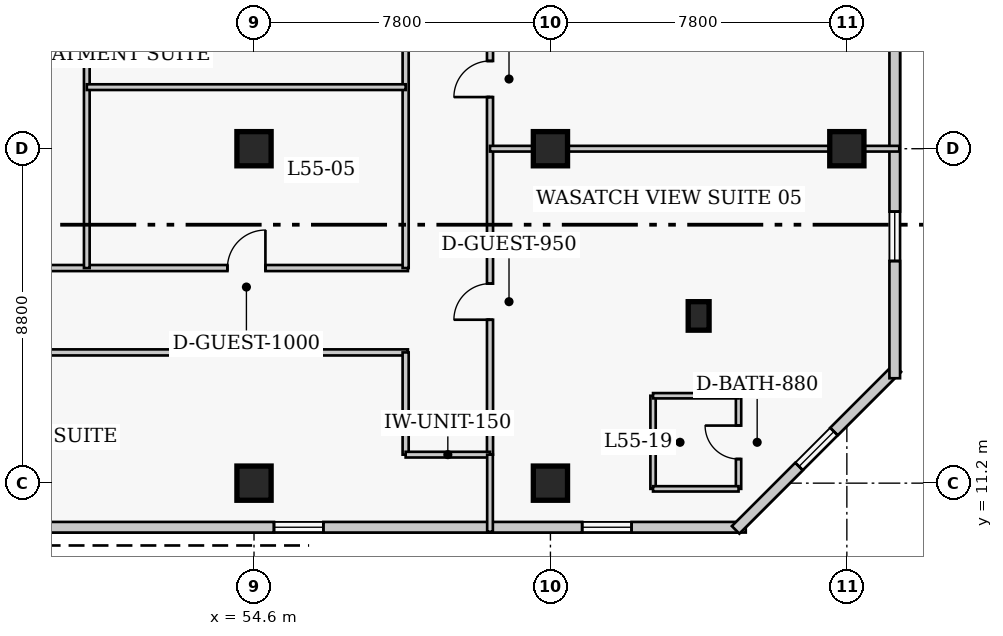
"""IFC4 building model, lengths in metres.
Left out: names, types, materials, properties, quantities, classifications, styles, units other than length and angle.
Written with IfcOpenShell. Run it as: python <this file> out.ifc"""

import sys

from ifc_helpers import new_model, si_unit, direction, frame, frame_2d, origin, origin_2d, place, context, subcontext, project, spatial, rectangle, extrude, element, fill, save


model = new_model("IFC4")
c1 = context("Model", 3, precision=1e-05, world=origin(), true_north=direction((0.0, 1.0)))
c2 = subcontext(c1, "Body", "Model", "MODEL_VIEW")
j1 = project(units=[si_unit("LENGTHUNIT", "METRE"), si_unit("PLANEANGLEUNIT", "RADIAN")], contexts=[c1])
p1 = place(None, origin())
s1 = spatial("IfcSite", under=j1, at=p1, CompositionType="ELEMENT")
p2 = place(p1, origin())
s2 = spatial("IfcBuilding", under=s1, at=p2, CompositionType="ELEMENT")
p3 = place(p2, frame((0.0, 0.0, 220.2)))
s3 = spatial("IfcBuildingStorey", under=s2, at=p3, CompositionType="ELEMENT", Elevation=220.2)
for number, where, z_axis, x_axis in (
    (1, (54.6, 11.2, 0.0), (0.0, 0.0, 1.0), (1.0, 0.0, 0.0)),
    (2, (54.6, 20.0, 0.0), (0.0, 0.0, 1.0), (1.0, 0.0, 0.0)),
    (3, (62.4, 11.2, 0.0), (0.0, 0.0, 1.0), (1.0, 0.0, 0.0)),
    (4, (62.4, 20.0, 0.0), (0.0, 0.0, 1.0), (1.0, 0.0, 0.0)),
    (5, (70.2, 20.0, 0.0), (0.0, 0.0, 1.0), (1.0, 0.0, 0.0)),
):
    element("IfcColumn", number, at=place(p3, frame(where, z_axis=z_axis, x_axis=x_axis)), inside=s3, PredefinedType="COLUMN", context=c2, shape_type="SweptSolid", body=[
        extrude(rectangle(XDim=0.9, YDim=0.9, at=origin_2d()), origin(), (0.0, 0.0, 1.0), 3.9),
    ])
p4 = place(p3, frame((66.3, 15.6, 0.0), z_axis=(0.0, 0.0, 1.0), x_axis=(1.0, 0.0, 0.0)))
e6 = element("IfcColumn", 6, at=p4, inside=s3, PredefinedType="PILASTER", context=c2, shape_type="SweptSolid", body=[
    extrude(rectangle(XDim=0.55, YDim=0.75, at=origin_2d()), origin(), (0.0, 0.0, 1.0), 3.9),
])
p5 = place(p3, frame((41.71, 10.04, 0.0), z_axis=(0.0, 0.0, 1.0), x_axis=(1.0, 0.0, 0.0)))
e7 = element("IfcWall", 7, at=p5, inside=s3, PredefinedType="SOLIDWALL", context=c2, shape_type="SweptSolid", body=[
    extrude(rectangle(XDim=25.83, YDim=0.28, at=frame_2d((12.915, 0.0))), origin(), (0.0, 0.0, 1.0), 3.65),
])
p6 = place(p5, frame((3.005, 0.0, 0.85)))
e8 = element("IfcOpeningElement", 8, at=p6, cuts=e7, PredefinedType="OPENING", context=c2, shape_type="SweptSolid", body=[
    extrude(rectangle(XDim=1.3, YDim=1.7, at=frame_2d((0.65, 0.85))), frame((0.0, 0.15, 0.0), z_axis=(0.0, -1.0, 0.0), x_axis=(1.0, 0.0, 0.0)), (0.0, 0.0, 1.0), 0.3),
])
p7 = place(p5, frame((13.415, 0.0, 0.85)))
e9 = element("IfcOpeningElement", 9, at=p7, cuts=e7, PredefinedType="OPENING", context=c2, shape_type="SweptSolid", body=[
    extrude(rectangle(XDim=1.3, YDim=1.7, at=frame_2d((0.65, 0.85))), frame((0.0, 0.15, 0.0), z_axis=(0.0, -1.0, 0.0), x_axis=(1.0, 0.0, 0.0)), (0.0, 0.0, 1.0), 0.3),
])
p8 = place(p5, frame((21.525, 0.0, 0.85)))
e10 = element("IfcOpeningElement", 10, at=p8, cuts=e7, PredefinedType="OPENING", context=c2, shape_type="SweptSolid", body=[
    extrude(rectangle(XDim=1.3, YDim=1.7, at=frame_2d((0.65, 0.85))), frame((0.0, 0.15, 0.0), z_axis=(0.0, -1.0, 0.0), x_axis=(1.0, 0.0, 0.0)), (0.0, 0.0, 1.0), 0.3),
])
p9 = place(p3, frame((67.273, 9.971, 0.0), z_axis=(0.0, 0.0, 1.0), x_axis=(0.707106781187, 0.707106781187, 0.0)))
e11 = element("IfcWall", 11, at=p9, inside=s3, PredefinedType="SOLIDWALL", context=c2, shape_type="SweptSolid", body=[
    extrude(rectangle(XDim=6.02, YDim=0.28, at=frame_2d((3.01, 0.0))), origin(), (0.0, 0.0, 1.0), 3.65),
])
p10 = place(p9, frame((2.36, 0.0, 0.85)))
e12 = element("IfcOpeningElement", 12, at=p10, cuts=e11, PredefinedType="OPENING", context=c2, shape_type="SweptSolid", body=[
    extrude(rectangle(XDim=1.3, YDim=1.7, at=frame_2d((0.65, 0.85))), frame((0.0, 0.15, 0.0), z_axis=(0.0, -1.0, 0.0), x_axis=(1.0, 0.0, 0.0)), (0.0, 0.0, 1.0), 0.3),
])
p11 = place(p3, frame((71.46, 13.96, 0.0), z_axis=(0.0, 0.0, 1.0), x_axis=(0.0, 1.0, 0.0)))
e13 = element("IfcWall", 13, at=p11, inside=s3, PredefinedType="SOLIDWALL", context=c2, shape_type="SweptSolid", body=[
    extrude(rectangle(XDim=29.88, YDim=0.28, at=frame_2d((14.94, 0.0))), origin(), (0.0, 0.0, 1.0), 3.65),
])
p12 = place(p11, frame((3.085, 0.0, 0.85)))
e14 = element("IfcOpeningElement", 14, at=p12, cuts=e13, PredefinedType="OPENING", context=c2, shape_type="SweptSolid", body=[
    extrude(rectangle(XDim=1.3, YDim=1.7, at=frame_2d((0.65, 0.85))), frame((0.0, 0.15, 0.0), z_axis=(0.0, -1.0, 0.0), x_axis=(1.0, 0.0, 0.0)), (0.0, 0.0, 1.0), 0.3),
])
p13 = place(p11, frame((10.555, 0.0, 0.85)))
e15 = element("IfcOpeningElement", 15, at=p13, cuts=e13, PredefinedType="OPENING", context=c2, shape_type="SweptSolid", body=[
    extrude(rectangle(XDim=1.3, YDim=1.7, at=frame_2d((0.65, 0.85))), frame((0.0, 0.15, 0.0), z_axis=(0.0, -1.0, 0.0), x_axis=(1.0, 0.0, 0.0)), (0.0, 0.0, 1.0), 0.3),
])
p14 = place(p11, frame((18.025, 0.0, 0.85)))
e16 = element("IfcOpeningElement", 16, at=p14, cuts=e13, PredefinedType="OPENING", context=c2, shape_type="SweptSolid", body=[
    extrude(rectangle(XDim=1.3, YDim=1.7, at=frame_2d((0.65, 0.85))), frame((0.0, 0.15, 0.0), z_axis=(0.0, -1.0, 0.0), x_axis=(1.0, 0.0, 0.0)), (0.0, 0.0, 1.0), 0.3),
])
p15 = place(p11, frame((25.495, 0.0, 0.85)))
e17 = element("IfcOpeningElement", 17, at=p15, cuts=e13, PredefinedType="OPENING", context=c2, shape_type="SweptSolid", body=[
    extrude(rectangle(XDim=1.3, YDim=1.7, at=frame_2d((0.65, 0.85))), frame((0.0, 0.15, 0.0), z_axis=(0.0, -1.0, 0.0), x_axis=(1.0, 0.0, 0.0)), (0.0, 0.0, 1.0), 0.3),
])
p16 = place(p3, frame((35.85, 16.86, 0.0), z_axis=(0.0, 0.0, 1.0), x_axis=(1.0, 0.0, 0.0)))
e18 = element("IfcWall", 18, at=p16, inside=s3, PredefinedType="PARTITIONING", context=c2, shape_type="SweptSolid", body=[
    extrude(rectangle(XDim=22.8, YDim=0.16, at=frame_2d((11.4, 0.0))), origin(), (0.0, 0.0, 1.0), 3.65),
])
p17 = place(p16, frame((9.65, 0.0, 0.0)))
e19 = element("IfcOpeningElement", 19, at=p17, cuts=e18, PredefinedType="OPENING", context=c2, shape_type="SweptSolid", body=[
    extrude(rectangle(XDim=1.0, YDim=2.15, at=frame_2d((0.5, 1.075))), frame((0.0, 0.09, 0.0), z_axis=(0.0, -1.0, 0.0), x_axis=(1.0, 0.0, 0.0)), (0.0, 0.0, 1.0), 0.18),
])
p18 = place(p16, frame((18.05, 0.0, 0.0)))
e20 = element("IfcOpeningElement", 20, at=p18, cuts=e18, PredefinedType="OPENING", context=c2, shape_type="SweptSolid", body=[
    extrude(rectangle(XDim=1.0, YDim=2.15, at=frame_2d((0.5, 1.075))), frame((0.0, 0.09, 0.0), z_axis=(0.0, -1.0, 0.0), x_axis=(1.0, 0.0, 0.0)), (0.0, 0.0, 1.0), 0.18),
])
p19 = place(p3, frame((35.8, 14.64, 0.0), z_axis=(0.0, 0.0, 1.0), x_axis=(1.0, 0.0, 0.0)))
e21 = element("IfcWall", 21, at=p19, inside=s3, PredefinedType="PARTITIONING", context=c2, shape_type="SweptSolid", body=[
    extrude(rectangle(XDim=22.85, YDim=0.16, at=frame_2d((11.425, 0.0))), origin(), (0.0, 0.0, 1.0), 3.65),
])
p20 = place(p19, frame((5.748, 0.0, 0.0)))
e22 = element("IfcOpeningElement", 22, at=p20, cuts=e21, PredefinedType="OPENING", context=c2, shape_type="SweptSolid", body=[
    extrude(rectangle(XDim=1.0, YDim=2.15, at=frame_2d((0.5, 1.075))), frame((0.0, 0.09, 0.0), z_axis=(0.0, -1.0, 0.0), x_axis=(1.0, 0.0, 0.0)), (0.0, 0.0, 1.0), 0.18),
])
p21 = place(p3, frame((60.81, 11.95, 0.0), z_axis=(0.0, 0.0, 1.0), x_axis=(0.0, 1.0, 0.0)))
e23 = element("IfcWall", 23, at=p21, inside=s3, PredefinedType="PARTITIONING", context=c2, shape_type="SweptSolid", body=[
    extrude(rectangle(XDim=28.7, YDim=0.16, at=frame_2d((14.35, 0.0))), origin(), (0.0, 0.0, 1.0), 3.65),
])
p22 = place(p21, frame((3.55, 0.0, 0.0)))
e24 = element("IfcOpeningElement", 24, at=p22, cuts=e23, PredefinedType="OPENING", context=c2, shape_type="SweptSolid", body=[
    extrude(rectangle(XDim=0.95, YDim=2.1, at=frame_2d((0.475, 1.05))), frame((0.0, 0.09, 0.0), z_axis=(0.0, -1.0, 0.0), x_axis=(1.0, 0.0, 0.0)), (0.0, 0.0, 1.0), 0.18),
])
p23 = place(p21, frame((9.409, 0.0, 0.0)))
e25 = element("IfcOpeningElement", 25, at=p23, cuts=e23, PredefinedType="OPENING", context=c2, shape_type="SweptSolid", body=[
    extrude(rectangle(XDim=0.95, YDim=2.1, at=frame_2d((0.475, 1.05))), frame((0.0, 0.09, 0.0), z_axis=(0.0, -1.0, 0.0), x_axis=(1.0, 0.0, 0.0)), (0.0, 0.0, 1.0), 0.18),
])
p24 = place(p21, frame((27.26, 0.0, 0.0)))
e26 = element("IfcOpeningElement", 26, at=p24, cuts=e23, PredefinedType="OPENING", context=c2, shape_type="SweptSolid", body=[
    extrude(rectangle(XDim=1.0, YDim=2.15, at=frame_2d((0.5, 1.075))), frame((0.0, 0.09, 0.0), z_axis=(0.0, -1.0, 0.0), x_axis=(1.0, 0.0, 0.0)), (0.0, 0.0, 1.0), 0.18),
])
p25 = place(p3, frame((58.59, 16.86, 0.0), z_axis=(0.0, 0.0, 1.0), x_axis=(0.0, 1.0, 0.0)))
e27 = element("IfcWall", 27, at=p25, inside=s3, PredefinedType="PARTITIONING", context=c2, shape_type="SweptSolid", body=[
    extrude(rectangle(XDim=23.79, YDim=0.16, at=frame_2d((11.895, 0.0))), origin(), (0.0, 0.0, 1.0), 3.246),
])
p26 = place(p3, frame((58.59, 11.95, 0.0), z_axis=(0.0, 0.0, 1.0), x_axis=(0.0, 1.0, 0.0)))
e28 = element("IfcWall", 28, at=p26, inside=s3, PredefinedType="PARTITIONING", context=c2, shape_type="SweptSolid", body=[
    extrude(rectangle(XDim=2.69, YDim=0.16, at=frame_2d((1.345, 0.0))), origin(), (0.0, 0.0, 1.0), 3.246),
])
p27 = place(p3, frame((58.59, 11.95, 0.0), z_axis=(0.0, 0.0, 1.0), x_axis=(1.0, 0.0, 0.0)))
e29 = element("IfcWall", 29, at=p27, inside=s3, PredefinedType="PARTITIONING", context=c2, shape_type="SweptSolid", body=[
    extrude(rectangle(XDim=2.22, YDim=0.15, at=frame_2d((1.11, 0.0))), origin(), (0.0, 0.0, 1.0), 3.65),
])
p28 = place(p3, frame((50.2, 16.86, 0.0), z_axis=(0.0, 0.0, 1.0), x_axis=(0.0, 1.0, 0.0)))
e30 = element("IfcWall", 30, at=p28, inside=s3, PredefinedType="PARTITIONING", context=c2, shape_type="SweptSolid", body=[
    extrude(rectangle(XDim=10.29, YDim=0.15, at=frame_2d((5.145, 0.0))), origin(), (0.0, 0.0, 1.0), 3.65),
])
p29 = place(p3, frame((50.2, 21.62, 0.0), z_axis=(0.0, 0.0, 1.0), x_axis=(1.0, 0.0, 0.0)))
e31 = element("IfcWall", 31, at=p29, inside=s3, PredefinedType="PARTITIONING", context=c2, shape_type="SweptSolid", body=[
    extrude(rectangle(XDim=8.39, YDim=0.15, at=frame_2d((4.195, 0.0))), origin(), (0.0, 0.0, 1.0), 3.65),
])
p30 = place(p3, frame((60.81, 9.92, 0.0), z_axis=(0.0, 0.0, 1.0), x_axis=(0.0, 1.0, 0.0)))
e32 = element("IfcWall", 32, at=p30, inside=s3, PredefinedType="PARTITIONING", context=c2, shape_type="SweptSolid", body=[
    extrude(rectangle(XDim=2.03, YDim=0.15, at=frame_2d((1.015, 0.0))), origin(), (0.0, 0.0, 1.0), 3.65),
])
p31 = place(p3, frame((65.1, 11.05, 0.0), z_axis=(0.0, 0.0, 1.0), x_axis=(0.0, 1.0, 0.0)))
e33 = element("IfcWall", 33, at=p31, inside=s3, PredefinedType="PLUMBINGWALL", context=c2, shape_type="SweptSolid", body=[
    extrude(rectangle(XDim=2.45, YDim=0.14, at=frame_2d((1.225, 0.0))), origin(), (0.0, 0.0, 1.0), 3.65),
])
p32 = place(p3, frame((67.35, 11.05, 0.0), z_axis=(0.0, 0.0, 1.0), x_axis=(0.0, 1.0, 0.0)))
e34 = element("IfcWall", 34, at=p32, inside=s3, PredefinedType="PLUMBINGWALL", context=c2, shape_type="SweptSolid", body=[
    extrude(rectangle(XDim=2.45, YDim=0.14, at=frame_2d((1.225, 0.0))), origin(), (0.0, 0.0, 1.0), 3.65),
])
p33 = place(p32, frame((0.785, 0.0, 0.0)))
e35 = element("IfcOpeningElement", 35, at=p33, cuts=e34, PredefinedType="OPENING", context=c2, shape_type="SweptSolid", body=[
    extrude(rectangle(XDim=0.88, YDim=2.05, at=frame_2d((0.44, 1.025))), frame((0.0, 0.08, 0.0), z_axis=(0.0, -1.0, 0.0), x_axis=(1.0, 0.0, 0.0)), (0.0, 0.0, 1.0), 0.16),
])
for number, where, z_axis, x_axis in (
    (36, (65.1, 11.05, 0.0), (0.0, 0.0, 1.0), (1.0, 0.0, 0.0)),
    (37, (65.1, 13.5, 0.0), (0.0, 0.0, 1.0), (1.0, 0.0, 0.0)),
):
    element("IfcWall", number, at=place(p3, frame(where, z_axis=z_axis, x_axis=x_axis)), inside=s3, PredefinedType="PLUMBINGWALL", context=c2, shape_type="SweptSolid", body=[
        extrude(rectangle(XDim=2.25, YDim=0.14, at=frame_2d((1.125, 0.0))), origin(), (0.0, 0.0, 1.0), 3.65),
    ])
p34 = place(p3, frame((60.81, 20.0, 0.0), z_axis=(0.0, 0.0, 1.0), x_axis=(1.0, 0.0, 0.0)))
e38 = element("IfcWall", 38, at=p34, inside=s3, PredefinedType="PARTITIONING", context=c2, shape_type="SweptSolid", body=[
    extrude(rectangle(XDim=10.77, YDim=0.15, at=frame_2d((5.385, 0.0))), origin(), (0.0, 0.0, 1.0), 2.878),
])
p35 = place(p7, origin())
e39 = element("IfcWindow", 39, at=p35, inside=s3, PartitioningType="SINGLE_PANEL", PredefinedType="WINDOW", context=c2, shape_type="SweptSolid", body=[
    extrude(rectangle(XDim=1.3, YDim=1.7, at=frame_2d((0.65, 0.85))), frame((0.0, 0.03, 0.0), z_axis=(0.0, -1.0, 0.0), x_axis=(1.0, 0.0, 0.0)), (0.0, 0.0, 1.0), 0.06),
])
fill(e9, e39)
p36 = place(p8, origin())
e40 = element("IfcWindow", 40, at=p36, inside=s3, PartitioningType="SINGLE_PANEL", PredefinedType="WINDOW", context=c2, shape_type="SweptSolid", body=[
    extrude(rectangle(XDim=1.3, YDim=1.7, at=frame_2d((0.65, 0.85))), frame((0.0, 0.03, 0.0), z_axis=(0.0, -1.0, 0.0), x_axis=(1.0, 0.0, 0.0)), (0.0, 0.0, 1.0), 0.06),
])
fill(e10, e40)
p37 = place(p10, origin())
e41 = element("IfcWindow", 41, at=p37, inside=s3, PartitioningType="SINGLE_PANEL", PredefinedType="WINDOW", context=c2, shape_type="SweptSolid", body=[
    extrude(rectangle(XDim=1.3, YDim=1.7, at=frame_2d((0.65, 0.85))), frame((0.0, 0.03, 0.0), z_axis=(0.0, -1.0, 0.0), x_axis=(1.0, 0.0, 0.0)), (0.0, 0.0, 1.0), 0.06),
])
fill(e12, e41)
p38 = place(p12, origin())
e42 = element("IfcWindow", 42, at=p38, inside=s3, PartitioningType="SINGLE_PANEL", PredefinedType="WINDOW", context=c2, shape_type="SweptSolid", body=[
    extrude(rectangle(XDim=1.3, YDim=1.7, at=frame_2d((0.65, 0.85))), frame((0.0, 0.03, 0.0), z_axis=(0.0, -1.0, 0.0), x_axis=(1.0, 0.0, 0.0)), (0.0, 0.0, 1.0), 0.06),
])
fill(e14, e42)
p39 = place(p18, origin())
e43 = element("IfcDoor", 43, at=p39, inside=s3, OperationType="SINGLE_SWING_RIGHT", PredefinedType="DOOR", context=c2, shape_type="SweptSolid", body=[
    extrude(rectangle(XDim=1.0, YDim=2.15, at=frame_2d((0.5, 1.075))), frame((0.0, 0.025, 0.0), z_axis=(0.0, -1.0, 0.0), x_axis=(1.0, 0.0, 0.0)), (0.0, 0.0, 1.0), 0.05),
])
fill(e20, e43)
p40 = place(p33, origin())
e44 = element("IfcDoor", 44, at=p40, inside=s3, OperationType="SINGLE_SWING_RIGHT", PredefinedType="DOOR", context=c2, shape_type="SweptSolid", body=[
    extrude(rectangle(XDim=0.88, YDim=2.05, at=frame_2d((0.44, 1.025))), frame((0.0, 0.025, 0.0), z_axis=(0.0, -1.0, 0.0), x_axis=(1.0, 0.0, 0.0)), (0.0, 0.0, 1.0), 0.05),
])
fill(e35, e44)
p41 = place(p22, origin())
e45 = element("IfcDoor", 45, at=p41, inside=s3, OperationType="SINGLE_SWING_LEFT", PredefinedType="DOOR", context=c2, shape_type="SweptSolid", body=[
    extrude(rectangle(XDim=0.95, YDim=2.1, at=frame_2d((0.475, 1.05))), frame((0.0, 0.025, 0.0), z_axis=(0.0, -1.0, 0.0), x_axis=(1.0, 0.0, 0.0)), (0.0, 0.0, 1.0), 0.05),
])
fill(e24, e45)
p42 = place(p23, origin())
e46 = element("IfcDoor", 46, at=p42, inside=s3, OperationType="SINGLE_SWING_LEFT", PredefinedType="DOOR", context=c2, shape_type="SweptSolid", body=[
    extrude(rectangle(XDim=0.95, YDim=2.1, at=frame_2d((0.475, 1.05))), frame((0.0, 0.025, 0.0), z_axis=(0.0, -1.0, 0.0), x_axis=(1.0, 0.0, 0.0)), (0.0, 0.0, 1.0), 0.05),
])
fill(e25, e46)
save(model, sys.argv[1])
